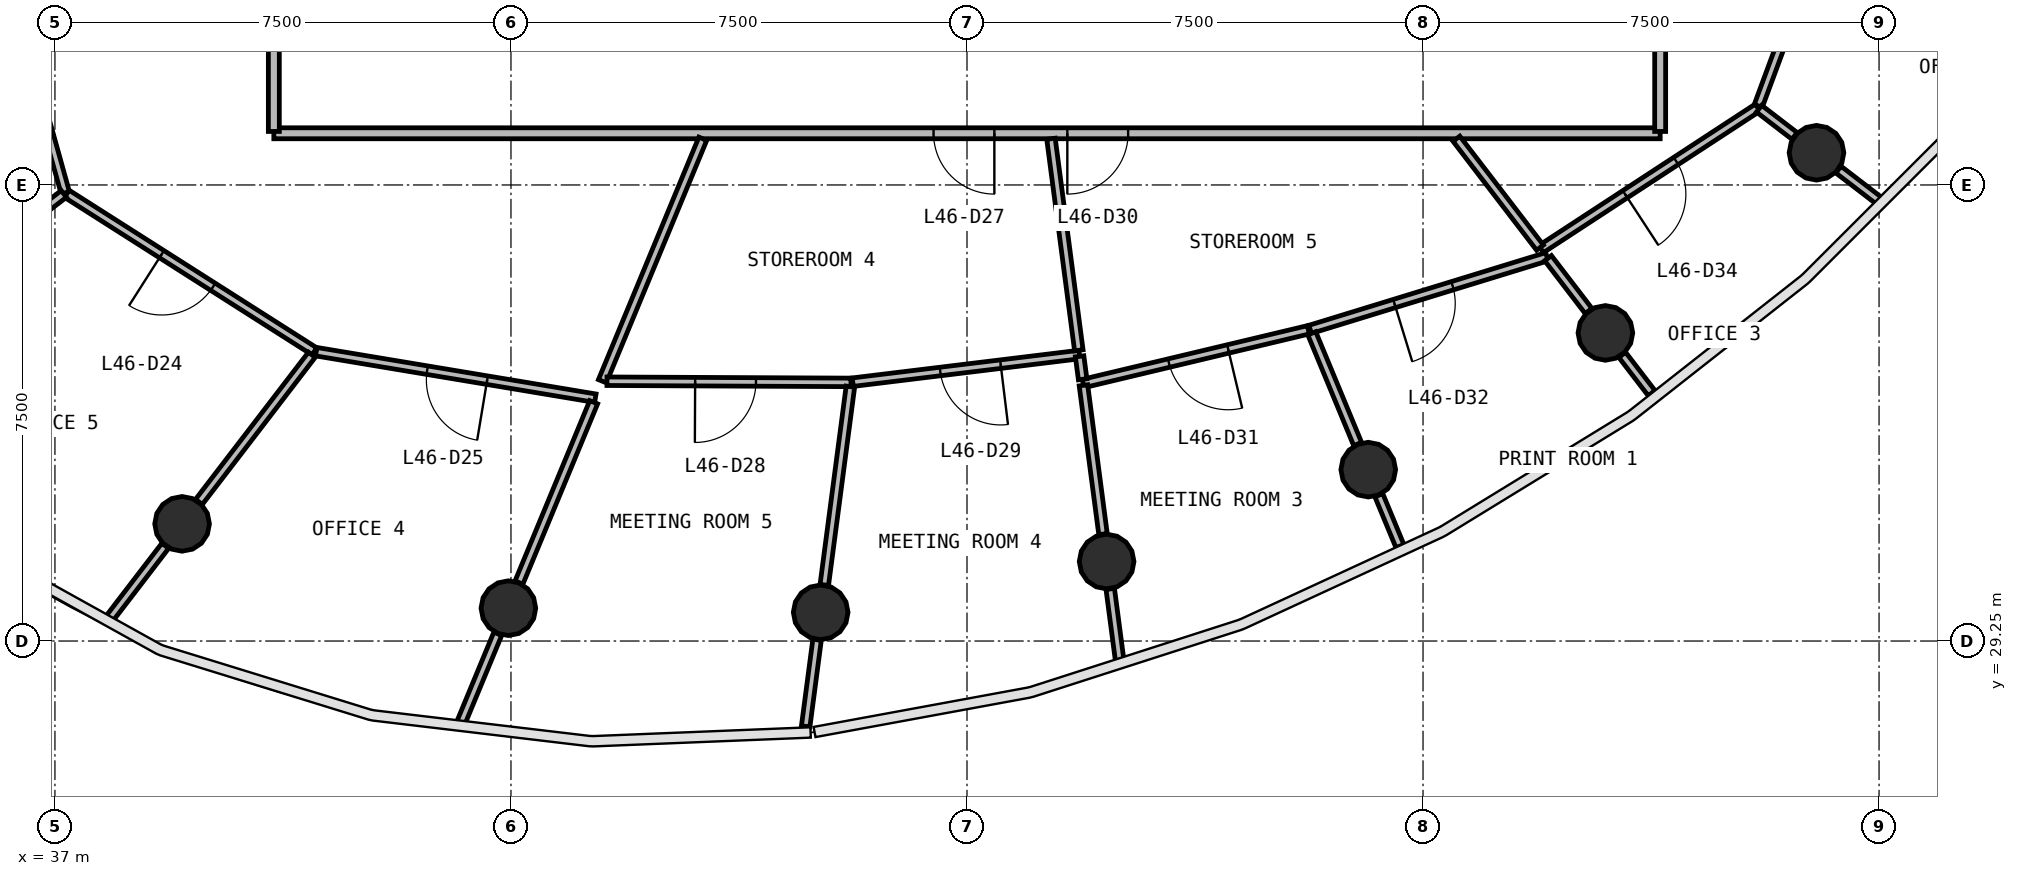
"""IFC4 building model, lengths in metres.
Left out: names, types, materials, properties, quantities, classifications, styles, units other than length and angle.
Written with IfcOpenShell. Run it as: python <this file> out.ifc"""

import sys

from ifc_helpers import new_model, si_unit, direction, frame, frame_2d, origin, origin_2d, place, context, subcontext, project, spatial, rectangle, circle, extrude, source, transform, mapped, element, fill, save


model = new_model("IFC4")
c1 = context("Model", 3, precision=1e-05, world=origin(), true_north=direction((0.0, 1.0)))
c2 = subcontext(c1, "Body", "Model", "MODEL_VIEW")
j1 = project(units=[si_unit("LENGTHUNIT", "METRE"), si_unit("PLANEANGLEUNIT", "RADIAN")], contexts=[c1])
p1 = place(None, origin())
s1 = spatial("IfcSite", under=j1, at=p1, CompositionType="ELEMENT")
p2 = place(p1, origin())
s2 = spatial("IfcBuilding", under=s1, at=p2, CompositionType="ELEMENT")
p3 = place(p2, frame((0.0, 0.0, 191.6)))
s3 = spatial("IfcBuildingStorey", under=s2, at=p3, CompositionType="ELEMENT", Elevation=191.6)
m1 = source(origin(), c2, "Body", "SweptSolid", [
    extrude(circle(Radius=0.45, at=origin_2d()), origin(), (0.0, 0.0, 1.0), 3.9),
])
for number, where, z_axis, x_axis in (
    (1, (39.091, 31.177, 0.0), (0.0, 0.0, 1.0), (1.0, 0.0, 0.0)),
    (2, (44.457, 29.79, 0.0), (0.0, 0.0, 1.0), (1.0, 0.0, 0.0)),
    (3, (49.594, 29.722, 0.0), (0.0, 0.0, 1.0), (1.0, 0.0, 0.0)),
    (4, (54.296, 30.558, 0.0), (0.0, 0.0, 1.0), (1.0, 0.0, 0.0)),
    (5, (58.599, 32.069, 0.0), (0.0, 0.0, 1.0), (1.0, 0.0, 0.0)),
    (6, (62.499, 34.317, 0.0), (0.0, 0.0, 1.0), (1.0, 0.0, 0.0)),
    (7, (65.971, 37.28, 0.0), (0.0, 0.0, 1.0), (1.0, 0.0, 0.0)),
):
    element("IfcColumn", number, at=place(p3, frame(where, z_axis=z_axis, x_axis=x_axis)), inside=s3, PredefinedType="COLUMN", context=c2, shape_type="MappedRepresentation", body=[
        mapped(m1, transform((0.0, 0.0, 0.0), scale=1.0)),
    ])
p4 = place(p3, frame((63.4, 37.6, 0.0), z_axis=(0.0, 0.0, 1.0), x_axis=(-1.0, 0.0, 0.0)))
e8 = element("IfcWall", 8, at=p4, inside=s3, PredefinedType="PARTITIONING", context=c2, shape_type="SweptSolid", body=[
    extrude(rectangle(XDim=22.8, YDim=0.18, at=frame_2d((11.4, 0.0))), origin(), (0.0, 0.0, 1.0), 2.88),
])
p5 = place(p4, frame((10.95, 0.0, 0.0)))
e9 = element("IfcOpeningElement", 9, at=p5, cuts=e8, PredefinedType="OPENING", context=c2, shape_type="SweptSolid", body=[
    extrude(rectangle(XDim=1.0, YDim=2.1, at=frame_2d((0.5, 1.05))), frame((0.0, 0.1, 0.0), z_axis=(0.0, -1.0, 0.0), x_axis=(1.0, 0.0, 0.0)), (0.0, 0.0, 1.0), 0.2),
])
p6 = place(p4, frame((8.75, 0.0, 0.0)))
e10 = element("IfcOpeningElement", 10, at=p6, cuts=e8, PredefinedType="OPENING", context=c2, shape_type="SweptSolid", body=[
    extrude(rectangle(XDim=1.0, YDim=2.1, at=frame_2d((0.5, 1.05))), frame((0.0, 0.1, 0.0), z_axis=(0.0, -1.0, 0.0), x_axis=(1.0, 0.0, 0.0)), (0.0, 0.0, 1.0), 0.2),
])
p7 = place(p3, frame((63.4, 58.37, 0.0), z_axis=(0.0, 0.0, 1.0), x_axis=(0.0, -1.0, 0.0)))
e11 = element("IfcWall", 11, at=p7, inside=s3, PredefinedType="PARTITIONING", context=c2, shape_type="SweptSolid", body=[
    extrude(rectangle(XDim=20.74, YDim=0.18, at=frame_2d((10.37, 0.0))), origin(), (0.0, 0.0, 1.0), 2.88),
])
p8 = place(p7, frame((9.89, 0.0, 0.0)))
e12 = element("IfcOpeningElement", 12, at=p8, cuts=e11, PredefinedType="OPENING", context=c2, shape_type="SweptSolid", body=[
    extrude(rectangle(XDim=1.0, YDim=2.1, at=frame_2d((0.5, 1.05))), frame((0.0, 0.1, 0.0), z_axis=(0.0, -1.0, 0.0), x_axis=(1.0, 0.0, 0.0)), (0.0, 0.0, 1.0), 0.2),
])
p9 = place(p7, frame((7.69, 0.0, 0.0)))
e13 = element("IfcOpeningElement", 13, at=p9, cuts=e11, PredefinedType="OPENING", context=c2, shape_type="SweptSolid", body=[
    extrude(rectangle(XDim=1.0, YDim=2.1, at=frame_2d((0.5, 1.05))), frame((0.0, 0.1, 0.0), z_axis=(0.0, -1.0, 0.0), x_axis=(1.0, 0.0, 0.0)), (0.0, 0.0, 1.0), 0.2),
])
p10 = place(p3, frame((40.6, 37.63, 0.0), z_axis=(0.0, 0.0, 1.0), x_axis=(0.0, 1.0, 0.0)))
e14 = element("IfcWall", 14, at=p10, inside=s3, PredefinedType="PARTITIONING", context=c2, shape_type="SweptSolid", body=[
    extrude(rectangle(XDim=20.74, YDim=0.18, at=frame_2d((10.37, 0.0))), origin(), (0.0, 0.0, 1.0), 2.88),
])
p11 = place(p10, frame((12.19, 0.0, 0.0)))
e15 = element("IfcOpeningElement", 15, at=p11, cuts=e14, PredefinedType="OPENING", context=c2, shape_type="SweptSolid", body=[
    extrude(rectangle(XDim=0.9, YDim=2.1, at=frame_2d((0.45, 1.05))), frame((0.0, 0.1, 0.0), z_axis=(0.0, -1.0, 0.0), x_axis=(1.0, 0.0, 0.0)), (0.0, 0.0, 1.0), 0.2),
])
p12 = place(p10, frame((9.99, 0.0, 0.0)))
e16 = element("IfcOpeningElement", 16, at=p12, cuts=e14, PredefinedType="OPENING", context=c2, shape_type="SweptSolid", body=[
    extrude(rectangle(XDim=0.9, YDim=2.1, at=frame_2d((0.45, 1.05))), frame((0.0, 0.1, 0.0), z_axis=(0.0, -1.0, 0.0), x_axis=(1.0, 0.0, 0.0)), (0.0, 0.0, 1.0), 0.2),
])
p13 = place(p10, frame((7.69, 0.0, 0.0)))
e17 = element("IfcOpeningElement", 17, at=p13, cuts=e14, PredefinedType="OPENING", context=c2, shape_type="SweptSolid", body=[
    extrude(rectangle(XDim=1.0, YDim=2.1, at=frame_2d((0.5, 1.05))), frame((0.0, 0.1, 0.0), z_axis=(0.0, -1.0, 0.0), x_axis=(1.0, 0.0, 0.0)), (0.0, 0.0, 1.0), 0.2),
])
p14 = place(p3, frame((37.17, 36.621, 0.0), z_axis=(0.0, 0.0, 1.0), x_axis=(-0.268661699129, 0.963234598331, 0.0)))
e18 = element("IfcWall", 18, at=p14, inside=s3, PredefinedType="PARTITIONING", context=c2, shape_type="SweptSolid", body=[
    extrude(rectangle(XDim=4.874, YDim=0.14, at=frame_2d((2.437, 0.0))), origin(), (0.0, 0.0, 1.0), 2.88),
])
p15 = place(p14, frame((2.023, 0.0, 0.0)))
e19 = element("IfcOpeningElement", 19, at=p15, cuts=e18, PredefinedType="OPENING", context=c2, shape_type="SweptSolid", body=[
    extrude(rectangle(XDim=1.0, YDim=2.1, at=frame_2d((0.5, 1.05))), frame((0.0, 0.08, 0.0), z_axis=(0.0, -1.0, 0.0), x_axis=(1.0, 0.0, 0.0)), (0.0, 0.0, 1.0), 0.16),
])
p16 = place(p3, frame((41.268, 34.013, 0.0), z_axis=(0.0, 0.0, 1.0), x_axis=(-0.843659404932, 0.536878765151, 0.0)))
e20 = element("IfcWall", 20, at=p16, inside=s3, PredefinedType="PARTITIONING", context=c2, shape_type="SweptSolid", body=[
    extrude(rectangle(XDim=4.827, YDim=0.14, at=frame_2d((2.413, 0.0))), origin(), (0.0, 0.0, 1.0), 2.88),
])
p17 = place(p16, frame((1.977, 0.0, 0.0)))
e21 = element("IfcOpeningElement", 21, at=p17, cuts=e20, PredefinedType="OPENING", context=c2, shape_type="SweptSolid", body=[
    extrude(rectangle(XDim=1.0, YDim=2.1, at=frame_2d((0.5, 1.05))), frame((0.0, 0.08, 0.0), z_axis=(0.0, -1.0, 0.0), x_axis=(1.0, 0.0, 0.0)), (0.0, 0.0, 1.0), 0.16),
])
p18 = place(p3, frame((45.888, 33.243, 0.0), z_axis=(0.0, 0.0, 1.0), x_axis=(-0.9863910879, 0.164416001993, 0.0)))
e22 = element("IfcWall", 22, at=p18, inside=s3, PredefinedType="PARTITIONING", context=c2, shape_type="SweptSolid", body=[
    extrude(rectangle(XDim=4.654, YDim=0.14, at=frame_2d((2.327, 0.0))), origin(), (0.0, 0.0, 1.0), 2.88),
])
p19 = place(p18, frame((1.804, 0.0, 0.0)))
e23 = element("IfcOpeningElement", 23, at=p19, cuts=e22, PredefinedType="OPENING", context=c2, shape_type="SweptSolid", body=[
    extrude(rectangle(XDim=1.0, YDim=2.1, at=frame_2d((0.5, 1.05))), frame((0.0, 0.08, 0.0), z_axis=(0.0, -1.0, 0.0), x_axis=(1.0, 0.0, 0.0)), (0.0, 0.0, 1.0), 0.16),
])
p20 = place(p3, frame((47.655, 37.51, 0.0), z_axis=(0.0, 0.0, 1.0), x_axis=(-0.382638241607, -0.923898249841, 0.0)))
e24 = element("IfcWall", 24, at=p20, inside=s3, PredefinedType="PARTITIONING", context=c2, shape_type="SweptSolid", body=[
    extrude(rectangle(XDim=4.316, YDim=0.14, at=frame_2d((2.158, 0.0))), origin(), (0.0, 0.0, 1.0), 2.88),
])
p21 = place(p3, frame((65.003, 38.022, 0.0), z_axis=(0.0, 0.0, 1.0), x_axis=(-0.837161645349, -0.546955555376, 0.0)))
e25 = element("IfcWall", 25, at=p21, inside=s3, PredefinedType="PARTITIONING", context=c2, shape_type="SweptSolid", body=[
    extrude(rectangle(XDim=4.254, YDim=0.14, at=frame_2d((2.127, 0.0))), origin(), (0.0, 0.0, 1.0), 2.88),
])
p22 = place(p21, frame((1.604, 0.0, 0.0)))
e26 = element("IfcOpeningElement", 26, at=p22, cuts=e25, PredefinedType="OPENING", context=c2, shape_type="SweptSolid", body=[
    extrude(rectangle(XDim=1.0, YDim=2.1, at=frame_2d((0.5, 1.05))), frame((0.0, 0.08, 0.0), z_axis=(0.0, -1.0, 0.0), x_axis=(1.0, 0.0, 0.0)), (0.0, 0.0, 1.0), 0.16),
])
p23 = place(p3, frame((66.476, 42.004, 0.0), z_axis=(0.0, 0.0, 1.0), x_axis=(-0.346867255576, -0.937914232225, 0.0)))
e27 = element("IfcWall", 27, at=p23, inside=s3, PredefinedType="PARTITIONING", context=c2, shape_type="SweptSolid", body=[
    extrude(rectangle(XDim=4.215, YDim=0.14, at=frame_2d((2.108, 0.0))), origin(), (0.0, 0.0, 1.0), 2.88),
])
p24 = place(p23, frame((1.565, 0.0, 0.0)))
e28 = element("IfcOpeningElement", 28, at=p24, cuts=e27, PredefinedType="OPENING", context=c2, shape_type="SweptSolid", body=[
    extrude(rectangle(XDim=1.0, YDim=2.1, at=frame_2d((0.5, 1.05))), frame((0.0, 0.08, 0.0), z_axis=(0.0, -1.0, 0.0), x_axis=(1.0, 0.0, 0.0)), (0.0, 0.0, 1.0), 0.16),
])
p25 = place(p3, frame((50.092, 33.503, 0.0), z_axis=(0.0, 0.0, 1.0), x_axis=(-0.999989026326, 0.00468478675, 0.0)))
e29 = element("IfcWall", 29, at=p25, inside=s3, PredefinedType="PARTITIONING", context=c2, shape_type="SweptSolid", body=[
    extrude(rectangle(XDim=4.013, YDim=0.14, at=frame_2d((2.006, 0.0))), origin(), (0.0, 0.0, 1.0), 2.88),
])
p26 = place(p25, frame((1.562, 0.0, 0.0)))
e30 = element("IfcOpeningElement", 30, at=p26, cuts=e29, PredefinedType="OPENING", context=c2, shape_type="SweptSolid", body=[
    extrude(rectangle(XDim=1.0, YDim=2.1, at=frame_2d((0.5, 1.05))), frame((0.0, 0.08, 0.0), z_axis=(0.0, -1.0, 0.0), x_axis=(1.0, 0.0, 0.0)), (0.0, 0.0, 1.0), 0.16),
])
p27 = place(p3, frame((61.538, 35.57, 0.0), z_axis=(0.0, 0.0, 1.0), x_axis=(-0.956031356948, -0.293264461761, 0.0)))
e31 = element("IfcWall", 31, at=p27, inside=s3, PredefinedType="PARTITIONING", context=c2, shape_type="SweptSolid", body=[
    extrude(rectangle(XDim=4.073, YDim=0.14, at=frame_2d((2.037, 0.0))), origin(), (0.0, 0.0, 1.0), 2.88),
])
p28 = place(p27, frame((1.624, 0.0, 0.0)))
e32 = element("IfcOpeningElement", 32, at=p28, cuts=e31, PredefinedType="OPENING", context=c2, shape_type="SweptSolid", body=[
    extrude(rectangle(XDim=1.0, YDim=2.1, at=frame_2d((0.5, 1.05))), frame((0.0, 0.08, 0.0), z_axis=(0.0, -1.0, 0.0), x_axis=(1.0, 0.0, 0.0)), (0.0, 0.0, 1.0), 0.16),
])
p29 = place(p3, frame((57.615, 34.368, 0.0), z_axis=(0.0, 0.0, 1.0), x_axis=(-0.972718080969, -0.231990376859, 0.0)))
e33 = element("IfcWall", 33, at=p29, inside=s3, PredefinedType="PARTITIONING", context=c2, shape_type="SweptSolid", body=[
    extrude(rectangle(XDim=3.807, YDim=0.14, at=frame_2d((1.904, 0.0))), origin(), (0.0, 0.0, 1.0), 2.88),
])
p30 = place(p29, frame((1.357, 0.0, 0.0)))
e34 = element("IfcOpeningElement", 34, at=p30, cuts=e33, PredefinedType="OPENING", context=c2, shape_type="SweptSolid", body=[
    extrude(rectangle(XDim=1.0, YDim=2.1, at=frame_2d((0.5, 1.05))), frame((0.0, 0.08, 0.0), z_axis=(0.0, -1.0, 0.0), x_axis=(1.0, 0.0, 0.0)), (0.0, 0.0, 1.0), 0.16),
])
p31 = place(p3, frame((53.848, 33.961, 0.0), z_axis=(0.0, 0.0, 1.0), x_axis=(-0.992659211772, -0.120944984534, 0.0)))
e35 = element("IfcWall", 35, at=p31, inside=s3, PredefinedType="PARTITIONING", context=c2, shape_type="SweptSolid", body=[
    extrude(rectangle(XDim=3.755, YDim=0.14, at=frame_2d((1.877, 0.0))), origin(), (0.0, 0.0, 1.0), 2.88),
])
p32 = place(p31, frame((1.305, 0.0, 0.0)))
e36 = element("IfcOpeningElement", 36, at=p32, cuts=e35, PredefinedType="OPENING", context=c2, shape_type="SweptSolid", body=[
    extrude(rectangle(XDim=1.0, YDim=2.1, at=frame_2d((0.5, 1.05))), frame((0.0, 0.08, 0.0), z_axis=(0.0, -1.0, 0.0), x_axis=(1.0, 0.0, 0.0)), (0.0, 0.0, 1.0), 0.16),
])
p33 = place(p3, frame((53.381, 37.51, 0.0), z_axis=(0.0, 0.0, 1.0), x_axis=(0.130504898859, -0.991447664465, 0.0)))
e37 = element("IfcWall", 37, at=p33, inside=s3, PredefinedType="PARTITIONING", context=c2, shape_type="SweptSolid", body=[
    extrude(rectangle(XDim=3.51, YDim=0.14, at=frame_2d((1.755, 0.0))), origin(), (0.0, 0.0, 1.0), 2.88),
])
p34 = place(p3, frame((50.082, 33.434, 0.0), z_axis=(0.0, 0.0, 1.0), x_axis=(-0.130554348709, -0.991441154095, 0.0)))
e38 = element("IfcWall", 38, at=p34, inside=s3, PredefinedType="PARTITIONING", context=c2, shape_type="SweptSolid", body=[
    extrude(rectangle(XDim=3.289, YDim=0.14, at=frame_2d((1.645, 0.0))), origin(), (0.0, 0.0, 1.0), 2.88),
])
p35 = place(p3, frame((37.146, 36.603, 0.0), z_axis=(0.0, 0.0, 1.0), x_axis=(-0.79334126978, -0.608777159282, 0.0)))
e39 = element("IfcWall", 39, at=p35, inside=s3, PredefinedType="PARTITIONING", context=c2, shape_type="SweptSolid", body=[
    extrude(rectangle(XDim=3.262, YDim=0.14, at=frame_2d((1.631, 0.0))), origin(), (0.0, 0.0, 1.0), 2.88),
])
p36 = place(p3, frame((45.86, 33.177, 0.0), z_axis=(0.0, 0.0, 1.0), x_axis=(-0.382703241838, -0.92387132691, 0.0)))
e40 = element("IfcWall", 40, at=p36, inside=s3, PredefinedType="PARTITIONING", context=c2, shape_type="SweptSolid", body=[
    extrude(rectangle(XDim=3.211, YDim=0.14, at=frame_2d((1.605, 0.0))), origin(), (0.0, 0.0, 1.0), 2.88),
])
p37 = place(p3, frame((41.225, 33.958, 0.0), z_axis=(0.0, 0.0, 1.0), x_axis=(-0.608774269811, -0.793343487032, 0.0)))
e41 = element("IfcWall", 41, at=p37, inside=s3, PredefinedType="PARTITIONING", context=c2, shape_type="SweptSolid", body=[
    extrude(rectangle(XDim=3.05, YDim=0.14, at=frame_2d((1.525, 0.0))), origin(), (0.0, 0.0, 1.0), 2.88),
])
p38 = place(p3, frame((53.915, 33.455, 0.0), z_axis=(0.0, 0.0, 1.0), x_axis=(0.130569656045, -0.991439138284, 0.0)))
e42 = element("IfcWall", 42, at=p38, inside=s3, PredefinedType="PARTITIONING", context=c2, shape_type="SweptSolid", body=[
    extrude(rectangle(XDim=2.468, YDim=0.14, at=frame_2d((1.234, 0.0))), origin(), (0.0, 0.0, 1.0), 2.88),
])
p39 = place(p3, frame((60.049, 37.51, 0.0), z_axis=(0.0, 0.0, 1.0), x_axis=(0.608738046736, -0.793371281593, 0.0)))
e43 = element("IfcWall", 43, at=p39, inside=s3, PredefinedType="PARTITIONING", context=c2, shape_type="SweptSolid", body=[
    extrude(rectangle(XDim=2.257, YDim=0.14, at=frame_2d((1.128, 0.0))), origin(), (0.0, 0.0, 1.0), 2.88),
])
p40 = place(p3, frame((57.67, 34.31, 0.0), z_axis=(0.0, 0.0, 1.0), x_axis=(0.382679925467, -0.923880985108, 0.0)))
e44 = element("IfcWall", 44, at=p40, inside=s3, PredefinedType="PARTITIONING", context=c2, shape_type="SweptSolid", body=[
    extrude(rectangle(XDim=1.971, YDim=0.14, at=frame_2d((0.986, 0.0))), origin(), (0.0, 0.0, 1.0), 2.88),
])
p41 = place(p3, frame((44.283, 29.37, 0.0), z_axis=(0.0, 0.0, 1.0), x_axis=(-0.382783129322, -0.923838230377, 0.0)))
e45 = element("IfcWall", 45, at=p41, inside=s3, PredefinedType="PARTITIONING", context=c2, shape_type="SweptSolid", body=[
    extrude(rectangle(XDim=1.6, YDim=0.14, at=frame_2d((0.8, 0.0))), origin(), (0.0, 0.0, 1.0), 2.88),
])
p42 = place(p3, frame((38.814, 30.816, 0.0), z_axis=(0.0, 0.0, 1.0), x_axis=(-0.608734333178, -0.793374130919, 0.0)))
e46 = element("IfcWall", 46, at=p42, inside=s3, PredefinedType="PARTITIONING", context=c2, shape_type="SweptSolid", body=[
    extrude(rectangle(XDim=1.523, YDim=0.14, at=frame_2d((0.762, 0.0))), origin(), (0.0, 0.0, 1.0), 2.88),
])
p43 = place(p3, frame((49.534, 29.271, 0.0), z_axis=(0.0, 0.0, 1.0), x_axis=(-0.130472090904, -0.991451982445, 0.0)))
e47 = element("IfcWall", 47, at=p43, inside=s3, PredefinedType="PARTITIONING", context=c2, shape_type="SweptSolid", body=[
    extrude(rectangle(XDim=1.437, YDim=0.14, at=frame_2d((0.719, 0.0))), origin(), (0.0, 0.0, 1.0), 2.88),
])
p44 = place(p3, frame((54.356, 30.107, 0.0), z_axis=(0.0, 0.0, 1.0), x_axis=(0.130470558533, -0.9914521841, 0.0)))
e48 = element("IfcWall", 48, at=p44, inside=s3, PredefinedType="PARTITIONING", context=c2, shape_type="SweptSolid", body=[
    extrude(rectangle(XDim=1.181, YDim=0.14, at=frame_2d((0.59, 0.0))), origin(), (0.0, 0.0, 1.0), 2.88),
])
p45 = place(p3, frame((61.556, 35.546, 0.0), z_axis=(0.0, 0.0, 1.0), x_axis=(0.608740457709, -0.793369431695, 0.0)))
e49 = element("IfcWall", 49, at=p45, inside=s3, PredefinedType="PARTITIONING", context=c2, shape_type="SweptSolid", body=[
    extrude(rectangle(XDim=1.095, YDim=0.14, at=frame_2d((0.547, 0.0))), origin(), (0.0, 0.0, 1.0), 2.88),
])
p46 = place(p3, frame((58.773, 31.648, 0.0), z_axis=(0.0, 0.0, 1.0), x_axis=(0.382645109605, -0.923895405387, 0.0)))
e50 = element("IfcWall", 50, at=p46, inside=s3, PredefinedType="PARTITIONING", context=c2, shape_type="SweptSolid", body=[
    extrude(rectangle(XDim=0.907, YDim=0.14, at=frame_2d((0.453, 0.0))), origin(), (0.0, 0.0, 1.0), 2.88),
])
p47 = place(p3, frame((66.332, 37.003, 0.0), z_axis=(0.0, 0.0, 1.0), x_axis=(0.793390985662, -0.608712365466, 0.0)))
e51 = element("IfcWall", 51, at=p47, inside=s3, PredefinedType="PARTITIONING", context=c2, shape_type="SweptSolid", body=[
    extrude(rectangle(XDim=0.839, YDim=0.14, at=frame_2d((0.42, 0.0))), origin(), (0.0, 0.0, 1.0), 2.88),
])
p48 = place(p3, frame((62.776, 33.956, 0.0), z_axis=(0.0, 0.0, 1.0), x_axis=(0.608908709281, -0.79324030644, 0.0)))
e52 = element("IfcWall", 52, at=p48, inside=s3, PredefinedType="PARTITIONING", context=c2, shape_type="SweptSolid", body=[
    extrude(rectangle(XDim=0.795, YDim=0.14, at=frame_2d((0.397, 0.0))), origin(), (0.0, 0.0, 1.0), 2.88),
])
p49 = place(p3, frame((65.027, 38.004, 0.0), z_axis=(0.0, 0.0, 1.0), x_axis=(0.793339152382, -0.608779918606, 0.0)))
e53 = element("IfcWall", 53, at=p49, inside=s3, PredefinedType="PARTITIONING", context=c2, shape_type="SweptSolid", body=[
    extrude(rectangle(XDim=0.736, YDim=0.14, at=frame_2d((0.368, 0.0))), origin(), (0.0, 0.0, 1.0), 2.88),
])
p50 = place(p3, frame((53.852, 33.931, 0.0), z_axis=(0.0, 0.0, 1.0), x_axis=(0.130437891079, -0.991456482439, 0.0)))
e54 = element("IfcWall", 54, at=p50, inside=s3, PredefinedType="PARTITIONING", context=c2, shape_type="SweptSolid", body=[
    extrude(rectangle(XDim=0.38, YDim=0.14, at=frame_2d((0.19, 0.0))), origin(), (0.0, 0.0, 1.0), 2.88),
])
m2 = source(origin(), c2, "Body", "SweptSolid", [
    extrude(rectangle(XDim=1.0, YDim=2.1, at=frame_2d((0.5, 1.05))), frame((0.0, 0.025, 0.0), z_axis=(0.0, -1.0, 0.0), x_axis=(1.0, 0.0, 0.0)), (0.0, 0.0, 1.0), 0.05),
])
p51 = place(p17, origin())
e55 = element("IfcDoor", 55, at=p51, inside=s3, OperationType="SINGLE_SWING_RIGHT", PredefinedType="DOOR", context=c2, shape_type="MappedRepresentation", body=[
    mapped(m2, transform((0.0, 0.0, 0.0), scale=1.0)),
])
fill(e21, e55)
p52 = place(p19, origin())
e56 = element("IfcDoor", 56, at=p52, inside=s3, OperationType="SINGLE_SWING_LEFT", PredefinedType="DOOR", context=c2, shape_type="MappedRepresentation", body=[
    mapped(m2, transform((0.0, 0.0, 0.0), scale=1.0)),
])
fill(e23, e56)
p53 = place(p5, origin())
e57 = element("IfcDoor", 57, at=p53, inside=s3, OperationType="SINGLE_SWING_LEFT", PredefinedType="DOOR", context=c2, shape_type="MappedRepresentation", body=[
    mapped(m2, transform((0.0, 0.0, 0.0), scale=1.0)),
])
fill(e9, e57)
p54 = place(p26, origin())
e58 = element("IfcDoor", 58, at=p54, inside=s3, OperationType="SINGLE_SWING_RIGHT", PredefinedType="DOOR", context=c2, shape_type="MappedRepresentation", body=[
    mapped(m2, transform((0.0, 0.0, 0.0), scale=1.0)),
])
fill(e30, e58)
p55 = place(p32, origin())
e59 = element("IfcDoor", 59, at=p55, inside=s3, OperationType="SINGLE_SWING_LEFT", PredefinedType="DOOR", context=c2, shape_type="MappedRepresentation", body=[
    mapped(m2, transform((0.0, 0.0, 0.0), scale=1.0)),
])
fill(e36, e59)
p56 = place(p6, origin())
e60 = element("IfcDoor", 60, at=p56, inside=s3, OperationType="SINGLE_SWING_RIGHT", PredefinedType="DOOR", context=c2, shape_type="MappedRepresentation", body=[
    mapped(m2, transform((0.0, 0.0, 0.0), scale=1.0)),
])
fill(e10, e60)
p57 = place(p30, origin())
e61 = element("IfcDoor", 61, at=p57, inside=s3, OperationType="SINGLE_SWING_LEFT", PredefinedType="DOOR", context=c2, shape_type="MappedRepresentation", body=[
    mapped(m2, transform((0.0, 0.0, 0.0), scale=1.0)),
])
fill(e34, e61)
p58 = place(p28, origin())
e62 = element("IfcDoor", 62, at=p58, inside=s3, OperationType="SINGLE_SWING_RIGHT", PredefinedType="DOOR", context=c2, shape_type="MappedRepresentation", body=[
    mapped(m2, transform((0.0, 0.0, 0.0), scale=1.0)),
])
fill(e32, e62)
p59 = place(p22, origin())
e63 = element("IfcDoor", 63, at=p59, inside=s3, OperationType="SINGLE_SWING_RIGHT", PredefinedType="DOOR", context=c2, shape_type="MappedRepresentation", body=[
    mapped(m2, transform((0.0, 0.0, 0.0), scale=1.0)),
])
fill(e26, e63)
save(model, sys.argv[1])
